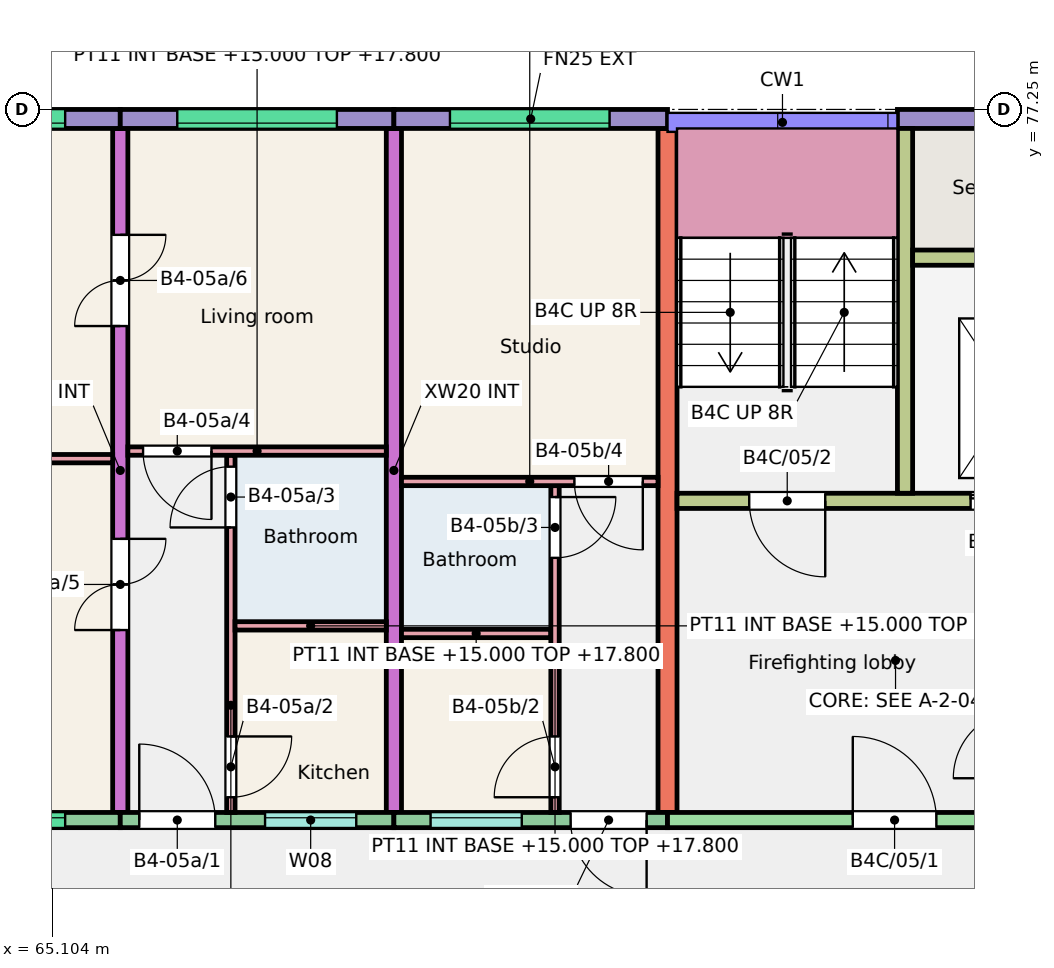
"""IFC4 building model, lengths in metres.
Left out: names, types, materials, properties, quantities, classifications, styles, units other than length and angle.
Written with IfcOpenShell. Run it as: python <this file> out.ifc"""

import sys

from ifc_helpers import new_model, si_unit, direction, frame, frame_2d, origin, place, context, subcontext, project, spatial, rectangle, extrude, element, fill, save


model = new_model("IFC4")
c1 = context("Model", 3, precision=1e-05, world=origin(), true_north=direction((0.0, 1.0)))
c2 = subcontext(c1, "Body", "Model", "MODEL_VIEW")
j1 = project(units=[si_unit("LENGTHUNIT", "METRE"), si_unit("PLANEANGLEUNIT", "RADIAN")], contexts=[c1])
p1 = place(None, origin())
s1 = spatial("IfcSite", under=j1, at=p1, CompositionType="ELEMENT")
p2 = place(p1, origin())
s2 = spatial("IfcBuilding", under=s1, at=p2, CompositionType="ELEMENT")
p3 = place(p2, frame((0.0, 0.0, 15.0)))
s3 = spatial("IfcBuildingStorey", under=s2, at=p3, CompositionType="ELEMENT", Elevation=15.0)
p4 = place(p3, frame((66.0, 68.0, 0.0), z_axis=(0.0, 0.0, 1.0), x_axis=(0.0, 1.0, 0.0)))
e1 = element("IfcWall", 1, at=p4, inside=s3, PredefinedType="SHEAR", context=c2, shape_type="SweptSolid", body=[
    extrude(rectangle(XDim=9.0, YDim=0.2, at=frame_2d((4.5, 0.0))), origin(), (0.0, 0.0, 1.0), 3.0),
])
p5 = place(p4, frame((2.4, 0.0, 0.0)))
e2 = element("IfcOpeningElement", 2, at=p5, cuts=e1, PredefinedType="OPENING", context=c2, shape_type="SweptSolid", body=[
    extrude(rectangle(XDim=1.2, YDim=2.1, at=frame_2d((0.6, 1.05))), frame((0.0, 0.11, 0.0), z_axis=(0.0, -1.0, 0.0), x_axis=(1.0, 0.0, 0.0)), (0.0, 0.0, 1.0), 0.22),
])
p6 = place(p4, frame((6.4, 0.0, 0.0)))
e3 = element("IfcOpeningElement", 3, at=p6, cuts=e1, PredefinedType="OPENING", context=c2, shape_type="SweptSolid", body=[
    extrude(rectangle(XDim=1.2, YDim=2.1, at=frame_2d((0.6, 1.05))), frame((0.0, 0.11, 0.0), z_axis=(0.0, -1.0, 0.0), x_axis=(1.0, 0.0, 0.0)), (0.0, 0.0, 1.0), 0.22),
])
p7 = place(p3, frame((69.6, 68.0, 0.0), z_axis=(0.0, 0.0, 1.0), x_axis=(0.0, 1.0, 0.0)))
e4 = element("IfcWall", 4, at=p7, inside=s3, PredefinedType="SHEAR", context=c2, shape_type="SweptSolid", body=[
    extrude(rectangle(XDim=9.0, YDim=0.2, at=frame_2d((4.5, 0.0))), origin(), (0.0, 0.0, 1.0), 3.0),
])
p8 = place(p3, frame((73.2, 68.0, 0.0), z_axis=(0.0, 0.0, 1.0), x_axis=(0.0, 1.0, 0.0)))
e5 = element("IfcWall", 5, at=p8, inside=s3, PredefinedType="SHEAR", context=c2, shape_type="SweptSolid", body=[
    extrude(rectangle(XDim=9.0, YDim=0.25, at=frame_2d((4.5, 0.0))), origin(), (0.0, 0.0, 1.0), 3.0),
])
p9 = place(p3, frame((62.4, 77.125, 0.0), z_axis=(0.0, 0.0, 1.0), x_axis=(1.0, 0.0, 0.0)))
e6 = element("IfcWall", 6, at=p9, inside=s3, PredefinedType="SOLIDWALL", context=c2, shape_type="SweptSolid", body=[
    extrude(rectangle(XDim=3.6, YDim=0.25, at=frame_2d((1.8, 0.0))), origin(), (0.0, 0.0, 1.0), 3.0),
])
p10 = place(p9, frame((0.775, 0.0, 1.2)))
e7 = element("IfcOpeningElement", 7, at=p10, cuts=e6, PredefinedType="OPENING", context=c2, shape_type="SweptSolid", body=[
    extrude(rectangle(XDim=2.1, YDim=1.2, at=frame_2d((1.05, 0.6))), frame((0.0, 0.135, 0.0), z_axis=(0.0, -1.0, 0.0), x_axis=(1.0, 0.0, 0.0)), (0.0, 0.0, 1.0), 0.27),
])
p11 = place(p3, frame((62.55, 67.9, 0.0), z_axis=(0.0, 0.0, 1.0), x_axis=(1.0, 0.0, 0.0)))
e8 = element("IfcWall", 8, at=p11, inside=s3, PredefinedType="SOLIDWALL", context=c2, shape_type="SweptSolid", body=[
    extrude(rectangle(XDim=3.45, YDim=0.2, at=frame_2d((1.725, 0.0))), origin(), (0.0, 0.0, 1.0), 3.0),
])
p12 = place(p11, frame((0.625, 0.0, 1.2)))
e9 = element("IfcOpeningElement", 9, at=p12, cuts=e8, PredefinedType="OPENING", context=c2, shape_type="SweptSolid", body=[
    extrude(rectangle(XDim=2.1, YDim=1.2, at=frame_2d((1.05, 0.6))), frame((0.0, 0.11, 0.0), z_axis=(0.0, -1.0, 0.0), x_axis=(1.0, 0.0, 0.0)), (0.0, 0.0, 1.0), 0.22),
])
p13 = place(p3, frame((66.0, 77.125, 0.0), z_axis=(0.0, 0.0, 1.0), x_axis=(1.0, 0.0, 0.0)))
e10 = element("IfcWall", 10, at=p13, inside=s3, PredefinedType="SOLIDWALL", context=c2, shape_type="SweptSolid", body=[
    extrude(rectangle(XDim=3.6, YDim=0.25, at=frame_2d((1.8, 0.0))), origin(), (0.0, 0.0, 1.0), 3.0),
])
p14 = place(p13, frame((0.75, 0.0, 1.2)))
e11 = element("IfcOpeningElement", 11, at=p14, cuts=e10, PredefinedType="OPENING", context=c2, shape_type="SweptSolid", body=[
    extrude(rectangle(XDim=2.1, YDim=1.2, at=frame_2d((1.05, 0.6))), frame((0.0, 0.135, 0.0), z_axis=(0.0, -1.0, 0.0), x_axis=(1.0, 0.0, 0.0)), (0.0, 0.0, 1.0), 0.27),
])
p15 = place(p3, frame((66.0, 67.9, 0.0), z_axis=(0.0, 0.0, 1.0), x_axis=(1.0, 0.0, 0.0)))
e12 = element("IfcWall", 12, at=p15, inside=s3, PredefinedType="SOLIDWALL", context=c2, shape_type="SweptSolid", body=[
    extrude(rectangle(XDim=3.6, YDim=0.2, at=frame_2d((1.8, 0.0))), origin(), (0.0, 0.0, 1.0), 3.0),
])
p16 = place(p15, frame((1.905, 0.0, 1.1)))
e13 = element("IfcOpeningElement", 13, at=p16, cuts=e12, PredefinedType="OPENING", context=c2, shape_type="SweptSolid", body=[
    extrude(rectangle(XDim=1.2, YDim=1.3, at=frame_2d((0.6, 0.65))), frame((0.0, 0.11, 0.0), z_axis=(0.0, -1.0, 0.0), x_axis=(1.0, 0.0, 0.0)), (0.0, 0.0, 1.0), 0.22),
])
p17 = place(p15, frame((0.25, 0.0, 0.0)))
e14 = element("IfcOpeningElement", 14, at=p17, cuts=e12, PredefinedType="OPENING", context=c2, shape_type="SweptSolid", body=[
    extrude(rectangle(XDim=1.0, YDim=2.1, at=frame_2d((0.5, 1.05))), frame((0.0, 0.11, 0.0), z_axis=(0.0, -1.0, 0.0), x_axis=(1.0, 0.0, 0.0)), (0.0, 0.0, 1.0), 0.22),
])
p18 = place(p3, frame((69.6, 77.125, 0.0), z_axis=(0.0, 0.0, 1.0), x_axis=(1.0, 0.0, 0.0)))
e15 = element("IfcWall", 15, at=p18, inside=s3, PredefinedType="SOLIDWALL", context=c2, shape_type="SweptSolid", body=[
    extrude(rectangle(XDim=3.6, YDim=0.25, at=frame_2d((1.8, 0.0))), origin(), (0.0, 0.0, 1.0), 3.0),
])
p19 = place(p18, frame((0.738, 0.0, 1.2)))
e16 = element("IfcOpeningElement", 16, at=p19, cuts=e15, PredefinedType="OPENING", context=c2, shape_type="SweptSolid", body=[
    extrude(rectangle(XDim=2.1, YDim=1.2, at=frame_2d((1.05, 0.6))), frame((0.0, 0.135, 0.0), z_axis=(0.0, -1.0, 0.0), x_axis=(1.0, 0.0, 0.0)), (0.0, 0.0, 1.0), 0.27),
])
p20 = place(p3, frame((69.6, 67.9, 0.0), z_axis=(0.0, 0.0, 1.0), x_axis=(1.0, 0.0, 0.0)))
e17 = element("IfcWall", 17, at=p20, inside=s3, PredefinedType="SOLIDWALL", context=c2, shape_type="SweptSolid", body=[
    extrude(rectangle(XDim=3.6, YDim=0.2, at=frame_2d((1.8, 0.0))), origin(), (0.0, 0.0, 1.0), 3.0),
])
p21 = place(p20, frame((0.482, 0.0, 1.1)))
e18 = element("IfcOpeningElement", 18, at=p21, cuts=e17, PredefinedType="OPENING", context=c2, shape_type="SweptSolid", body=[
    extrude(rectangle(XDim=1.2, YDim=1.3, at=frame_2d((0.6, 0.65))), frame((0.0, 0.11, 0.0), z_axis=(0.0, -1.0, 0.0), x_axis=(1.0, 0.0, 0.0)), (0.0, 0.0, 1.0), 0.22),
])
p22 = place(p20, frame((2.325, 0.0, 0.0)))
e19 = element("IfcOpeningElement", 19, at=p22, cuts=e17, PredefinedType="OPENING", context=c2, shape_type="SweptSolid", body=[
    extrude(rectangle(XDim=1.0, YDim=2.1, at=frame_2d((0.5, 1.05))), frame((0.0, 0.11, 0.0), z_axis=(0.0, -1.0, 0.0), x_axis=(1.0, 0.0, 0.0)), (0.0, 0.0, 1.0), 0.22),
])
p23 = place(p3, frame((76.225, 77.125, 0.0), z_axis=(0.0, 0.0, 1.0), x_axis=(1.0, 0.0, 0.0)))
e20 = element("IfcWall", 20, at=p23, inside=s3, PredefinedType="SOLIDWALL", context=c2, shape_type="SweptSolid", body=[
    extrude(rectangle(XDim=2.975, YDim=0.25, at=frame_2d((1.487, 0.0))), origin(), (0.0, 0.0, 1.0), 3.0),
])
p24 = place(p3, frame((73.2, 67.9, 0.0), z_axis=(0.0, 0.0, 1.0), x_axis=(1.0, 0.0, 0.0)))
e21 = element("IfcWall", 21, at=p24, inside=s3, PredefinedType="SHEAR", context=c2, shape_type="SweptSolid", body=[
    extrude(rectangle(XDim=5.85, YDim=0.2, at=frame_2d((2.925, 0.0))), origin(), (0.0, 0.0, 1.0), 3.0),
])
p25 = place(p24, frame((2.438, 0.0, 0.0)))
e22 = element("IfcOpeningElement", 22, at=p25, cuts=e21, PredefinedType="OPENING", context=c2, shape_type="SweptSolid", body=[
    extrude(rectangle(XDim=1.1, YDim=2.1, at=frame_2d((0.55, 1.05))), frame((0.0, 0.11, 0.0), z_axis=(0.0, -1.0, 0.0), x_axis=(1.0, 0.0, 0.0)), (0.0, 0.0, 1.0), 0.22),
])
p26 = place(p3, frame((73.325, 72.1, 0.0), z_axis=(0.0, 0.0, 1.0), x_axis=(1.0, 0.0, 0.0)))
e23 = element("IfcWall", 23, at=p26, inside=s3, PredefinedType="SHEAR", context=c2, shape_type="SweptSolid", body=[
    extrude(rectangle(XDim=5.725, YDim=0.2, at=frame_2d((2.863, 0.0))), origin(), (0.0, 0.0, 1.0), 3.0),
])
p27 = place(p26, frame((0.95, 0.0, 0.0)))
e24 = element("IfcOpeningElement", 24, at=p27, cuts=e23, PredefinedType="OPENING", context=c2, shape_type="SweptSolid", body=[
    extrude(rectangle(XDim=1.0, YDim=2.1, at=frame_2d((0.5, 1.05))), frame((0.0, 0.11, 0.0), z_axis=(0.0, -1.0, 0.0), x_axis=(1.0, 0.0, 0.0)), (0.0, 0.0, 1.0), 0.22),
])
p28 = place(p26, frame((3.863, 0.0, 0.0)))
e25 = element("IfcOpeningElement", 25, at=p28, cuts=e23, PredefinedType="OPENING", context=c2, shape_type="SweptSolid", body=[
    extrude(rectangle(XDim=1.1, YDim=2.1, at=frame_2d((0.55, 1.05))), frame((0.0, 0.11, 0.0), z_axis=(0.0, -1.0, 0.0), x_axis=(1.0, 0.0, 0.0)), (0.0, 0.0, 1.0), 0.22),
])
p29 = place(p3, frame((76.325, 72.2, 0.0), z_axis=(0.0, 0.0, 1.0), x_axis=(0.0, 1.0, 0.0)))
e26 = element("IfcWall", 26, at=p29, inside=s3, PredefinedType="SHEAR", context=c2, shape_type="SweptSolid", body=[
    extrude(rectangle(XDim=4.8, YDim=0.2, at=frame_2d((2.4, 0.0))), origin(), (0.0, 0.0, 1.0), 3.0),
])
p30 = place(p3, frame((76.425, 75.3, 0.0), z_axis=(0.0, 0.0, 1.0), x_axis=(1.0, 0.0, 0.0)))
e27 = element("IfcWall", 27, at=p30, inside=s3, PredefinedType="SHEAR", context=c2, shape_type="SweptSolid", body=[
    extrude(rectangle(XDim=2.625, YDim=0.2, at=frame_2d((1.312, 0.0))), origin(), (0.0, 0.0, 1.0), 3.0),
])
p31 = place(p3, frame((67.455, 68.0, 0.0), z_axis=(0.0, 0.0, 1.0), x_axis=(0.0, 1.0, 0.0)))
e28 = element("IfcWall", 28, at=p31, inside=s3, PredefinedType="PARTITIONING", context=c2, shape_type="SweptSolid", body=[
    extrude(rectangle(XDim=4.7, YDim=0.11, at=frame_2d((2.35, 0.0))), origin(), (0.0, 0.0, 1.0), 2.8),
])
p32 = place(p31, frame((0.2, 0.0, 0.0)))
e29 = element("IfcOpeningElement", 29, at=p32, cuts=e28, PredefinedType="OPENING", context=c2, shape_type="SweptSolid", body=[
    extrude(rectangle(XDim=0.8, YDim=2.1, at=frame_2d((0.4, 1.05))), frame((0.0, 0.065, 0.0), z_axis=(0.0, -1.0, 0.0), x_axis=(1.0, 0.0, 0.0)), (0.0, 0.0, 1.0), 0.13),
])
p33 = place(p31, frame((3.75, 0.0, 0.0)))
e30 = element("IfcOpeningElement", 30, at=p33, cuts=e28, PredefinedType="OPENING", context=c2, shape_type="SweptSolid", body=[
    extrude(rectangle(XDim=0.8, YDim=2.1, at=frame_2d((0.4, 1.05))), frame((0.0, 0.065, 0.0), z_axis=(0.0, -1.0, 0.0), x_axis=(1.0, 0.0, 0.0)), (0.0, 0.0, 1.0), 0.13),
])
p34 = place(p3, frame((67.51, 70.455, 0.0), z_axis=(0.0, 0.0, 1.0), x_axis=(1.0, 0.0, 0.0)))
e31 = element("IfcWall", 31, at=p34, inside=s3, PredefinedType="PARTITIONING", context=c2, shape_type="SweptSolid", body=[
    extrude(rectangle(XDim=1.99, YDim=0.11, at=frame_2d((0.995, 0.0))), origin(), (0.0, 0.0, 1.0), 2.8),
])
p35 = place(p3, frame((66.1, 72.755, 0.0), z_axis=(0.0, 0.0, 1.0), x_axis=(1.0, 0.0, 0.0)))
e32 = element("IfcWall", 32, at=p35, inside=s3, PredefinedType="PARTITIONING", context=c2, shape_type="SweptSolid", body=[
    extrude(rectangle(XDim=3.4, YDim=0.11, at=frame_2d((1.7, 0.0))), origin(), (0.0, 0.0, 1.0), 2.8),
])
p36 = place(p35, frame((0.2, 0.0, 0.0)))
e33 = element("IfcOpeningElement", 33, at=p36, cuts=e32, PredefinedType="OPENING", context=c2, shape_type="SweptSolid", body=[
    extrude(rectangle(XDim=0.9, YDim=2.1, at=frame_2d((0.45, 1.05))), frame((0.0, 0.065, 0.0), z_axis=(0.0, -1.0, 0.0), x_axis=(1.0, 0.0, 0.0)), (0.0, 0.0, 1.0), 0.13),
])
p37 = place(p3, frame((62.55, 72.655, 0.0), z_axis=(0.0, 0.0, 1.0), x_axis=(1.0, 0.0, 0.0)))
e34 = element("IfcWall", 34, at=p37, inside=s3, PredefinedType="PARTITIONING", context=c2, shape_type="SweptSolid", body=[
    extrude(rectangle(XDim=3.35, YDim=0.11, at=frame_2d((1.675, 0.0))), origin(), (0.0, 0.0, 1.0), 2.8),
])
p38 = place(p3, frame((69.7, 70.355, 0.0), z_axis=(0.0, 0.0, 1.0), x_axis=(1.0, 0.0, 0.0)))
e35 = element("IfcWall", 35, at=p38, inside=s3, PredefinedType="PARTITIONING", context=c2, shape_type="SweptSolid", body=[
    extrude(rectangle(XDim=1.965, YDim=0.11, at=frame_2d((0.982, 0.0))), origin(), (0.0, 0.0, 1.0), 2.8),
])
p39 = place(p3, frame((71.72, 68.0, 0.0), z_axis=(0.0, 0.0, 1.0), x_axis=(0.0, 1.0, 0.0)))
e36 = element("IfcWall", 36, at=p39, inside=s3, PredefinedType="PARTITIONING", context=c2, shape_type="SweptSolid", body=[
    extrude(rectangle(XDim=4.3, YDim=0.11, at=frame_2d((2.15, 0.0))), origin(), (0.0, 0.0, 1.0), 2.8),
])
p40 = place(p39, frame((0.2, 0.0, 0.0)))
e37 = element("IfcOpeningElement", 37, at=p40, cuts=e36, PredefinedType="OPENING", context=c2, shape_type="SweptSolid", body=[
    extrude(rectangle(XDim=0.8, YDim=2.1, at=frame_2d((0.4, 1.05))), frame((0.0, 0.065, 0.0), z_axis=(0.0, -1.0, 0.0), x_axis=(1.0, 0.0, 0.0)), (0.0, 0.0, 1.0), 0.13),
])
p41 = place(p39, frame((3.35, 0.0, 0.0)))
e38 = element("IfcOpeningElement", 38, at=p41, cuts=e36, PredefinedType="OPENING", context=c2, shape_type="SweptSolid", body=[
    extrude(rectangle(XDim=0.8, YDim=2.1, at=frame_2d((0.4, 1.05))), frame((0.0, 0.065, 0.0), z_axis=(0.0, -1.0, 0.0), x_axis=(1.0, 0.0, 0.0)), (0.0, 0.0, 1.0), 0.13),
])
p42 = place(p3, frame((69.7, 72.355, 0.0), z_axis=(0.0, 0.0, 1.0), x_axis=(1.0, 0.0, 0.0)))
e39 = element("IfcWall", 39, at=p42, inside=s3, PredefinedType="PARTITIONING", context=c2, shape_type="SweptSolid", body=[
    extrude(rectangle(XDim=3.375, YDim=0.11, at=frame_2d((1.688, 0.0))), origin(), (0.0, 0.0, 1.0), 2.8),
])
p43 = place(p42, frame((2.275, 0.0, 0.0)))
e40 = element("IfcOpeningElement", 40, at=p43, cuts=e39, PredefinedType="OPENING", context=c2, shape_type="SweptSolid", body=[
    extrude(rectangle(XDim=0.9, YDim=2.1, at=frame_2d((0.45, 1.05))), frame((0.0, 0.065, 0.0), z_axis=(0.0, -1.0, 0.0), x_axis=(1.0, 0.0, 0.0)), (0.0, 0.0, 1.0), 0.13),
])
p44 = place(p12, origin())
e41 = element("IfcWindow", 41, at=p44, inside=s3, PartitioningType="SINGLE_PANEL", PredefinedType="WINDOW", context=c2, shape_type="SweptSolid", body=[
    extrude(rectangle(XDim=2.1, YDim=1.2, at=frame_2d((1.05, 0.6))), frame((0.0, 0.06, 0.0), z_axis=(0.0, -1.0, 0.0), x_axis=(1.0, 0.0, 0.0)), (0.0, 0.0, 1.0), 0.06),
])
fill(e9, e41)
p45 = place(p10, origin())
e42 = element("IfcWindow", 42, at=p45, inside=s3, PartitioningType="SINGLE_PANEL", PredefinedType="WINDOW", context=c2, shape_type="SweptSolid", body=[
    extrude(rectangle(XDim=2.1, YDim=1.2, at=frame_2d((1.05, 0.6))), frame((0.0, -0.025, 0.0), z_axis=(0.0, -1.0, 0.0), x_axis=(1.0, 0.0, 0.0)), (0.0, 0.0, 1.0), 0.06),
])
fill(e7, e42)
p46 = place(p16, origin())
e43 = element("IfcWindow", 43, at=p46, inside=s3, PartitioningType="SINGLE_PANEL", PredefinedType="WINDOW", context=c2, shape_type="SweptSolid", body=[
    extrude(rectangle(XDim=1.2, YDim=1.3, at=frame_2d((0.6, 0.65))), frame((0.0, 0.06, 0.0), z_axis=(0.0, -1.0, 0.0), x_axis=(1.0, 0.0, 0.0)), (0.0, 0.0, 1.0), 0.06),
])
fill(e13, e43)
p47 = place(p14, origin())
e44 = element("IfcWindow", 44, at=p47, inside=s3, PartitioningType="SINGLE_PANEL", PredefinedType="WINDOW", context=c2, shape_type="SweptSolid", body=[
    extrude(rectangle(XDim=2.1, YDim=1.2, at=frame_2d((1.05, 0.6))), frame((0.0, -0.025, 0.0), z_axis=(0.0, -1.0, 0.0), x_axis=(1.0, 0.0, 0.0)), (0.0, 0.0, 1.0), 0.06),
])
fill(e11, e44)
p48 = place(p21, origin())
e45 = element("IfcWindow", 45, at=p48, inside=s3, PartitioningType="SINGLE_PANEL", PredefinedType="WINDOW", context=c2, shape_type="SweptSolid", body=[
    extrude(rectangle(XDim=1.2, YDim=1.3, at=frame_2d((0.6, 0.65))), frame((0.0, 0.06, 0.0), z_axis=(0.0, -1.0, 0.0), x_axis=(1.0, 0.0, 0.0)), (0.0, 0.0, 1.0), 0.06),
])
fill(e18, e45)
p49 = place(p19, origin())
e46 = element("IfcWindow", 46, at=p49, inside=s3, PartitioningType="SINGLE_PANEL", PredefinedType="WINDOW", context=c2, shape_type="SweptSolid", body=[
    extrude(rectangle(XDim=2.1, YDim=1.2, at=frame_2d((1.05, 0.6))), frame((0.0, -0.025, 0.0), z_axis=(0.0, -1.0, 0.0), x_axis=(1.0, 0.0, 0.0)), (0.0, 0.0, 1.0), 0.06),
])
fill(e16, e46)
p50 = place(p17, origin())
e47 = element("IfcDoor", 47, at=p50, inside=s3, OperationType="SINGLE_SWING_LEFT", PredefinedType="DOOR", context=c2, shape_type="SweptSolid", body=[
    extrude(rectangle(XDim=1.0, YDim=2.1, at=frame_2d((0.5, 1.05))), frame((0.0, 0.025, 0.0), z_axis=(0.0, -1.0, 0.0), x_axis=(1.0, 0.0, 0.0)), (0.0, 0.0, 1.0), 0.05),
])
fill(e14, e47)
p51 = place(p32, origin())
e48 = element("IfcDoor", 48, at=p51, inside=s3, OperationType="SINGLE_SWING_RIGHT", PredefinedType="DOOR", context=c2, shape_type="SweptSolid", body=[
    extrude(rectangle(XDim=0.8, YDim=2.1, at=frame_2d((0.4, 1.05))), frame((0.0, 0.025, 0.0), z_axis=(0.0, -1.0, 0.0), x_axis=(1.0, 0.0, 0.0)), (0.0, 0.0, 1.0), 0.05),
])
fill(e29, e48)
p52 = place(p33, origin())
e49 = element("IfcDoor", 49, at=p52, inside=s3, OperationType="SINGLE_SWING_LEFT", PredefinedType="DOOR", context=c2, shape_type="SweptSolid", body=[
    extrude(rectangle(XDim=0.8, YDim=2.1, at=frame_2d((0.4, 1.05))), frame((0.0, 0.025, 0.0), z_axis=(0.0, -1.0, 0.0), x_axis=(1.0, 0.0, 0.0)), (0.0, 0.0, 1.0), 0.05),
])
fill(e30, e49)
p53 = place(p36, origin())
e50 = element("IfcDoor", 50, at=p53, inside=s3, OperationType="SINGLE_SWING_RIGHT", PredefinedType="DOOR", context=c2, shape_type="SweptSolid", body=[
    extrude(rectangle(XDim=0.9, YDim=2.1, at=frame_2d((0.45, 1.05))), frame((0.0, 0.025, 0.0), z_axis=(0.0, -1.0, 0.0), x_axis=(1.0, 0.0, 0.0)), (0.0, 0.0, 1.0), 0.05),
])
fill(e33, e50)
p54 = place(p5, origin())
e51 = element("IfcDoor", 51, at=p54, inside=s3, OperationType="DOUBLE_DOOR_SINGLE_SWING", PredefinedType="DOOR", context=c2, shape_type="SweptSolid", body=[
    extrude(rectangle(XDim=1.2, YDim=2.1, at=frame_2d((0.6, 1.05))), frame((0.0, 0.025, 0.0), z_axis=(0.0, -1.0, 0.0), x_axis=(1.0, 0.0, 0.0)), (0.0, 0.0, 1.0), 0.05),
])
fill(e2, e51)
p55 = place(p6, origin())
e52 = element("IfcDoor", 52, at=p55, inside=s3, OperationType="DOUBLE_DOOR_SINGLE_SWING", PredefinedType="DOOR", context=c2, shape_type="SweptSolid", body=[
    extrude(rectangle(XDim=1.2, YDim=2.1, at=frame_2d((0.6, 1.05))), frame((0.0, 0.025, 0.0), z_axis=(0.0, -1.0, 0.0), x_axis=(1.0, 0.0, 0.0)), (0.0, 0.0, 1.0), 0.05),
])
fill(e3, e52)
p56 = place(p22, origin())
e53 = element("IfcDoor", 53, at=p56, inside=s3, OperationType="SINGLE_SWING_RIGHT", PredefinedType="DOOR", context=c2, shape_type="SweptSolid", body=[
    extrude(rectangle(XDim=1.0, YDim=2.1, at=frame_2d((0.5, 1.05))), frame((0.0, 0.025, 0.0), z_axis=(0.0, -1.0, 0.0), x_axis=(1.0, 0.0, 0.0)), (0.0, 0.0, 1.0), 0.05),
])
fill(e19, e53)
p57 = place(p40, origin())
e54 = element("IfcDoor", 54, at=p57, inside=s3, OperationType="SINGLE_SWING_LEFT", PredefinedType="DOOR", context=c2, shape_type="SweptSolid", body=[
    extrude(rectangle(XDim=0.8, YDim=2.1, at=frame_2d((0.4, 1.05))), frame((0.0, 0.025, 0.0), z_axis=(0.0, -1.0, 0.0), x_axis=(1.0, 0.0, 0.0)), (0.0, 0.0, 1.0), 0.05),
])
fill(e37, e54)
p58 = place(p41, origin())
e55 = element("IfcDoor", 55, at=p58, inside=s3, OperationType="SINGLE_SWING_RIGHT", PredefinedType="DOOR", context=c2, shape_type="SweptSolid", body=[
    extrude(rectangle(XDim=0.8, YDim=2.1, at=frame_2d((0.4, 1.05))), frame((0.0, 0.025, 0.0), z_axis=(0.0, -1.0, 0.0), x_axis=(1.0, 0.0, 0.0)), (0.0, 0.0, 1.0), 0.05),
])
fill(e38, e55)
p59 = place(p43, origin())
e56 = element("IfcDoor", 56, at=p59, inside=s3, OperationType="SINGLE_SWING_RIGHT", PredefinedType="DOOR", context=c2, shape_type="SweptSolid", body=[
    extrude(rectangle(XDim=0.9, YDim=2.1, at=frame_2d((0.45, 1.05))), frame((0.0, 0.025, 0.0), z_axis=(0.0, -1.0, 0.0), x_axis=(1.0, 0.0, 0.0)), (0.0, 0.0, 1.0), 0.05),
])
fill(e40, e56)
p60 = place(p25, origin())
e57 = element("IfcDoor", 57, at=p60, inside=s3, OperationType="SINGLE_SWING_LEFT", PredefinedType="DOOR", context=c2, shape_type="SweptSolid", body=[
    extrude(rectangle(XDim=1.1, YDim=2.1, at=frame_2d((0.55, 1.05))), frame((0.0, 0.025, 0.0), z_axis=(0.0, -1.0, 0.0), x_axis=(1.0, 0.0, 0.0)), (0.0, 0.0, 1.0), 0.05),
])
fill(e22, e57)
p61 = place(p27, origin())
e58 = element("IfcDoor", 58, at=p61, inside=s3, OperationType="SINGLE_SWING_RIGHT", PredefinedType="DOOR", context=c2, shape_type="SweptSolid", body=[
    extrude(rectangle(XDim=1.0, YDim=2.1, at=frame_2d((0.5, 1.05))), frame((0.0, 0.025, 0.0), z_axis=(0.0, -1.0, 0.0), x_axis=(1.0, 0.0, 0.0)), (0.0, 0.0, 1.0), 0.05),
])
fill(e24, e58)
p62 = place(p28, origin())
e59 = element("IfcDoor", 59, at=p62, inside=s3, OperationType="DOUBLE_DOOR_SLIDING", PredefinedType="DOOR", context=c2, shape_type="SweptSolid", body=[
    extrude(rectangle(XDim=1.1, YDim=2.1, at=frame_2d((0.55, 1.05))), frame((0.0, 0.025, 0.0), z_axis=(0.0, -1.0, 0.0), x_axis=(1.0, 0.0, 0.0)), (0.0, 0.0, 1.0), 0.05),
])
fill(e25, e59)
save(model, sys.argv[1])
